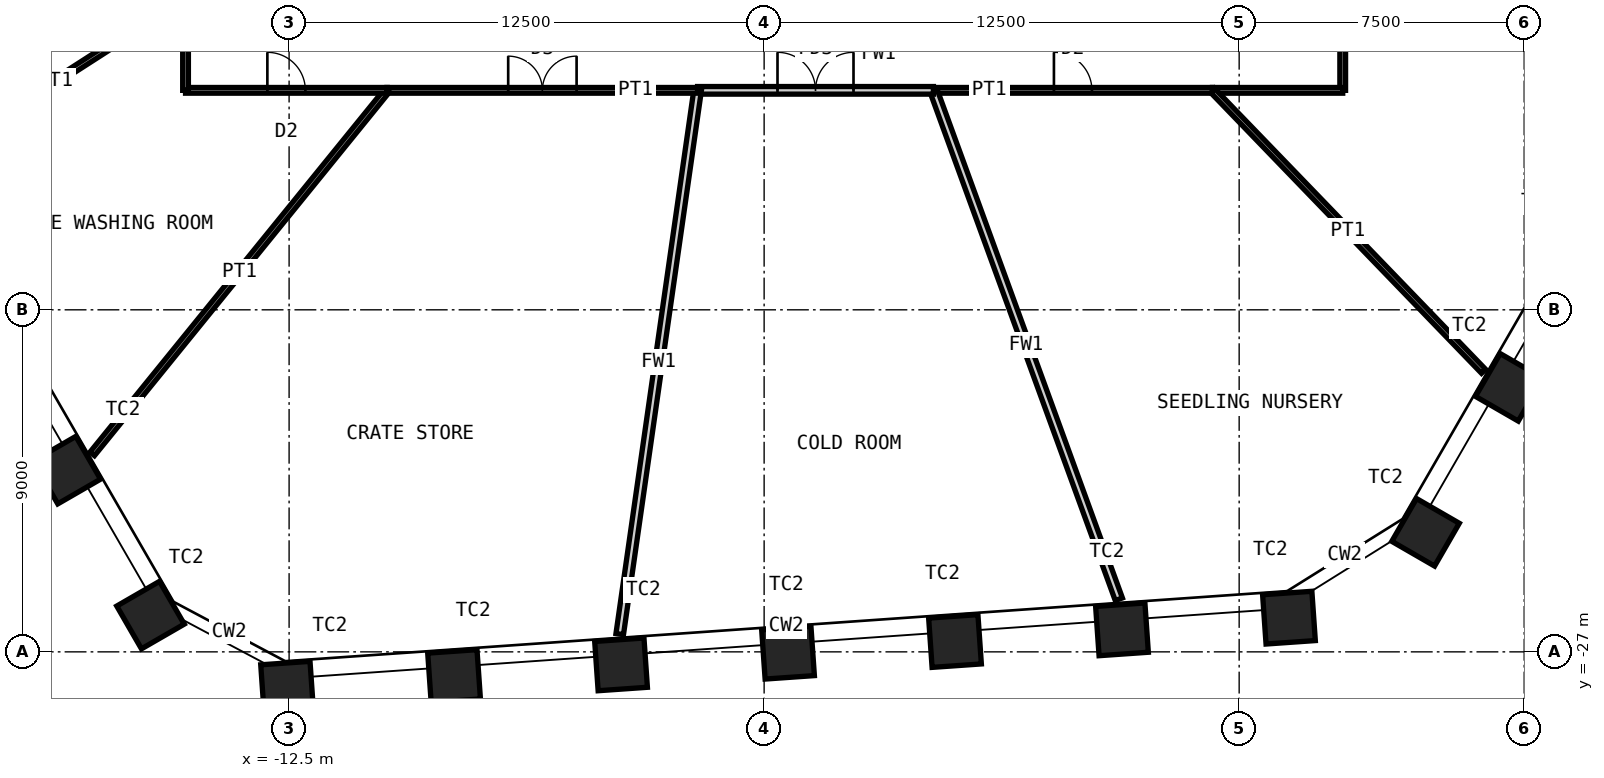
"""IFC4 building model, lengths in metres.
Left out: names, types, materials, properties, quantities, classifications, styles, units other than length and angle.
Written with IfcOpenShell. Run it as: python <this file> out.ifc"""

import sys

from ifc_helpers import new_model, si_unit, direction, frame, frame_2d, origin, origin_2d, place, context, subcontext, project, spatial, rectangle, hollow_rectangle, extrude, element, fill, save


model = new_model("IFC4")
c1 = context("Model", 3, precision=1e-05, world=origin(), true_north=direction((0.0, 1.0)))
c2 = subcontext(c1, "Body", "Model", "MODEL_VIEW")
j1 = project(units=[si_unit("LENGTHUNIT", "METRE"), si_unit("PLANEANGLEUNIT", "RADIAN")], contexts=[c1])
p1 = place(None, origin())
s1 = spatial("IfcSite", under=j1, at=p1, CompositionType="ELEMENT")
p2 = place(p1, origin())
s2 = spatial("IfcBuilding", under=s1, at=p2, CompositionType="ELEMENT")
p3 = place(p2, frame((0.0, 0.0, 87.0)))
s3 = spatial("IfcBuildingStorey", under=s2, at=p3, CompositionType="ELEMENT", Elevation=87.0)
for number, where, z_axis, x_axis in (
    (1, (19.607, -20.04, 0.0), (0.0, 0.0, 1.0), (0.5, 0.866, 0.0)),
    (2, (17.405, -23.854, 0.0), (0.0, 0.0, 1.0), (0.5, 0.866, 0.0)),
    (3, (13.811, -26.1, 0.0), (0.0, 0.0, 1.0), (0.998, 0.07, 0.0)),
    (4, (9.417, -26.407, 0.0), (0.0, 0.0, 1.0), (0.998, 0.07, 0.0)),
    (5, (5.023, -26.715, 0.0), (0.0, 0.0, 1.0), (0.998, 0.07, 0.0)),
    (6, (0.629, -27.022, 0.0), (0.0, 0.0, 1.0), (0.998, 0.07, 0.0)),
    (7, (-3.765, -27.329, 0.0), (0.0, 0.0, 1.0), (0.998, 0.07, 0.0)),
    (8, (-8.159, -27.636, 0.0), (0.0, 0.0, 1.0), (0.998, 0.07, 0.0)),
    (9, (-12.553, -27.944, 0.0), (0.0, 0.0, 1.0), (0.998, 0.07, 0.0)),
    (10, (-16.147, -26.033, 0.0), (0.0, 0.0, 1.0), (0.5, -0.866, 0.0)),
    (11, (-18.349, -22.218, 0.0), (0.0, 0.0, 1.0), (0.5, -0.866, 0.0)),
):
    element("IfcColumn", number, at=place(p3, frame(where, z_axis=z_axis, x_axis=x_axis)), inside=s3, PredefinedType="COLUMN", context=c2, shape_type="SweptSolid", body=[
        extrude(hollow_rectangle(XDim=1.3, YDim=1.3, WallThickness=0.1, at=origin_2d()), origin(), (0.0, 0.0, 1.0), 5.0),
    ])
p4 = place(p3, frame((15.225, -2.426, 0.0), z_axis=(0.0, 0.0, 1.0), x_axis=(0.0, -1.0, 0.0)))
e12 = element("IfcWall", 12, at=p4, inside=s3, PredefinedType="PARTITIONING", context=c2, shape_type="SweptSolid", body=[
    extrude(rectangle(XDim=9.799, YDim=0.15, at=frame_2d((4.899, 0.0))), origin(), (0.0, 0.0, 1.0), 4.8),
])
p5 = place(p4, frame((3.999, 0.0, 0.0)))
e13 = element("IfcOpeningElement", 13, at=p5, cuts=e12, PredefinedType="OPENING", context=c2, shape_type="SweptSolid", body=[
    extrude(rectangle(XDim=1.8, YDim=2.4, at=frame_2d((0.9, 1.2))), frame((0.0, 0.085, 0.0), z_axis=(0.0, -1.0, 0.0), x_axis=(1.0, 0.0, 0.0)), (0.0, 0.0, 1.0), 0.17),
])
p6 = place(p3, frame((15.225, -12.225, 0.0), z_axis=(0.0, 0.0, 1.0), x_axis=(-1.0, 0.0, 0.0)))
e14 = element("IfcWall", 14, at=p6, inside=s3, PredefinedType="PARTITIONING", context=c2, shape_type="SweptSolid", body=[
    extrude(rectangle(XDim=3.428, YDim=0.15, at=frame_2d((1.714, 0.0))), origin(), (0.0, 0.0, 1.0), 4.8),
])
p7 = place(p3, frame((18.931, -19.618, 0.0), z_axis=(0.0, 0.0, 1.0), x_axis=(-0.694399830455, 0.719589379761, 0.0)))
e15 = element("IfcWall", 15, at=p7, inside=s3, PredefinedType="PARTITIONING", context=c2, shape_type="SweptSolid", body=[
    extrude(rectangle(XDim=10.274, YDim=0.15, at=frame_2d((5.137, 0.0))), origin(), (0.0, 0.0, 1.0), 3.7),
])
p8 = place(p3, frame((11.797, -12.225, 0.0), z_axis=(0.0, 0.0, 1.0), x_axis=(-1.0, 0.0, 0.0)))
e16 = element("IfcWall", 16, at=p8, inside=s3, PredefinedType="PARTITIONING", context=c2, shape_type="SweptSolid", body=[
    extrude(rectangle(XDim=7.343, YDim=0.15, at=frame_2d((3.671, 0.0))), origin(), (0.0, 0.0, 1.0), 4.8),
])
p9 = place(p8, frame((3.171, 0.0, 0.0)))
e17 = element("IfcOpeningElement", 17, at=p9, cuts=e16, PredefinedType="OPENING", context=c2, shape_type="SweptSolid", body=[
    extrude(rectangle(XDim=1.0, YDim=2.4, at=frame_2d((0.5, 1.2))), frame((0.0, 0.085, 0.0), z_axis=(0.0, -1.0, 0.0), x_axis=(1.0, 0.0, 0.0)), (0.0, 0.0, 1.0), 0.17),
])
p10 = place(p3, frame((9.333, -25.615, 0.0), z_axis=(0.0, 0.0, 1.0), x_axis=(-0.342348208267, 0.939573150051, 0.0)))
e18 = element("IfcWall", 18, at=p10, inside=s3, PredefinedType="PARTITIONING", context=c2, shape_type="SweptSolid", body=[
    extrude(rectangle(XDim=14.251, YDim=0.2, at=frame_2d((7.125, 0.0))), origin(), (0.0, 0.0, 1.0), 3.7),
])
p11 = place(p3, frame((4.455, -12.225, 0.0), z_axis=(0.0, 0.0, 1.0), x_axis=(-1.0, 0.0, 0.0)))
e19 = element("IfcWall", 19, at=p11, inside=s3, PredefinedType="PARTITIONING", context=c2, shape_type="SweptSolid", body=[
    extrude(rectangle(XDim=6.205, YDim=0.2, at=frame_2d((3.103, 0.0))), origin(), (0.0, 0.0, 1.0), 4.8),
])
p12 = place(p11, frame((2.103, 0.0, 0.0)))
e20 = element("IfcOpeningElement", 20, at=p12, cuts=e19, PredefinedType="OPENING", context=c2, shape_type="SweptSolid", body=[
    extrude(rectangle(XDim=2.0, YDim=2.4, at=frame_2d((1.0, 1.2))), frame((0.0, 0.11, 0.0), z_axis=(0.0, -1.0, 0.0), x_axis=(1.0, 0.0, 0.0)), (0.0, 0.0, 1.0), 0.22),
])
p13 = place(p3, frame((-3.8, -26.532, 0.0), z_axis=(0.0, 0.0, 1.0), x_axis=(0.141776082978, 0.989898753558, 0.0)))
e21 = element("IfcWall", 21, at=p13, inside=s3, PredefinedType="PARTITIONING", context=c2, shape_type="SweptSolid", body=[
    extrude(rectangle(XDim=14.453, YDim=0.2, at=frame_2d((7.227, 0.0))), origin(), (0.0, 0.0, 1.0), 3.7),
])
p14 = place(p3, frame((-1.751, -12.225, 0.0), z_axis=(0.0, 0.0, 1.0), x_axis=(-1.0, 0.0, 0.0)))
e22 = element("IfcWall", 22, at=p14, inside=s3, PredefinedType="PARTITIONING", context=c2, shape_type="SweptSolid", body=[
    extrude(rectangle(XDim=8.168, YDim=0.15, at=frame_2d((4.084, 0.0))), origin(), (0.0, 0.0, 1.0), 4.8),
])
p15 = place(p14, frame((3.184, 0.0, 0.0)))
e23 = element("IfcOpeningElement", 23, at=p15, cuts=e22, PredefinedType="OPENING", context=c2, shape_type="SweptSolid", body=[
    extrude(rectangle(XDim=1.8, YDim=2.4, at=frame_2d((0.9, 1.2))), frame((0.0, 0.085, 0.0), z_axis=(0.0, -1.0, 0.0), x_axis=(1.0, 0.0, 0.0)), (0.0, 0.0, 1.0), 0.17),
])
p16 = place(p3, frame((-17.68, -21.791, 0.0), z_axis=(0.0, 0.0, 1.0), x_axis=(0.630058221556, 0.776547897718, 0.0)))
e24 = element("IfcWall", 24, at=p16, inside=s3, PredefinedType="PARTITIONING", context=c2, shape_type="SweptSolid", body=[
    extrude(rectangle(XDim=12.318, YDim=0.15, at=frame_2d((6.159, 0.0))), origin(), (0.0, 0.0, 1.0), 3.7),
])
p17 = place(p3, frame((-9.919, -12.225, 0.0), z_axis=(0.0, 0.0, 1.0), x_axis=(-1.0, 0.0, 0.0)))
e25 = element("IfcWall", 25, at=p17, inside=s3, PredefinedType="PARTITIONING", context=c2, shape_type="SweptSolid", body=[
    extrude(rectangle(XDim=5.306, YDim=0.15, at=frame_2d((2.653, 0.0))), origin(), (0.0, 0.0, 1.0), 4.8),
])
p18 = place(p17, frame((2.153, 0.0, 0.0)))
e26 = element("IfcOpeningElement", 26, at=p18, cuts=e25, PredefinedType="OPENING", context=c2, shape_type="SweptSolid", body=[
    extrude(rectangle(XDim=1.0, YDim=2.4, at=frame_2d((0.5, 1.2))), frame((0.0, 0.085, 0.0), z_axis=(0.0, -1.0, 0.0), x_axis=(1.0, 0.0, 0.0)), (0.0, 0.0, 1.0), 0.17),
])
p19 = place(p3, frame((-15.225, -12.225, 0.0), z_axis=(0.0, 0.0, 1.0), x_axis=(0.0, 1.0, 0.0)))
e27 = element("IfcWall", 27, at=p19, inside=s3, PredefinedType="PARTITIONING", context=c2, shape_type="SweptSolid", body=[
    extrude(rectangle(XDim=2.437, YDim=0.15, at=frame_2d((1.218, 0.0))), origin(), (0.0, 0.0, 1.0), 4.8),
])
p20 = place(p3, frame((-22.063, -14.185, 0.0), z_axis=(0.0, 0.0, 1.0), x_axis=(0.8411570088, 0.540790982309, 0.0)))
e28 = element("IfcWall", 28, at=p20, inside=s3, PredefinedType="PARTITIONING", context=c2, shape_type="SweptSolid", body=[
    extrude(rectangle(XDim=8.13, YDim=0.15, at=frame_2d((4.065, 0.0))), origin(), (0.0, 0.0, 1.0), 3.7),
])
p21 = place(p9, origin())
e29 = element("IfcDoor", 29, at=p21, inside=s3, OperationType="SINGLE_SWING_RIGHT", PredefinedType="DOOR", context=c2, shape_type="SweptSolid", body=[
    extrude(rectangle(XDim=1.0, YDim=2.4, at=frame_2d((0.5, 1.2))), frame((0.0, 0.025, 0.0), z_axis=(0.0, -1.0, 0.0), x_axis=(1.0, 0.0, 0.0)), (0.0, 0.0, 1.0), 0.05),
])
fill(e17, e29)
p22 = place(p12, origin())
e30 = element("IfcDoor", 30, at=p22, inside=s3, OperationType="DOUBLE_DOOR_DOUBLE_SWING", PredefinedType="DOOR", context=c2, shape_type="SweptSolid", body=[
    extrude(rectangle(XDim=2.0, YDim=2.4, at=frame_2d((1.0, 1.2))), frame((0.0, 0.025, 0.0), z_axis=(0.0, -1.0, 0.0), x_axis=(1.0, 0.0, 0.0)), (0.0, 0.0, 1.0), 0.05),
])
fill(e20, e30)
p23 = place(p15, origin())
e31 = element("IfcDoor", 31, at=p23, inside=s3, OperationType="DOUBLE_DOOR_DOUBLE_SWING", PredefinedType="DOOR", context=c2, shape_type="SweptSolid", body=[
    extrude(rectangle(XDim=1.8, YDim=2.4, at=frame_2d((0.9, 1.2))), frame((0.0, 0.025, 0.0), z_axis=(0.0, -1.0, 0.0), x_axis=(1.0, 0.0, 0.0)), (0.0, 0.0, 1.0), 0.05),
])
fill(e23, e31)
p24 = place(p18, origin())
e32 = element("IfcDoor", 32, at=p24, inside=s3, OperationType="SINGLE_SWING_RIGHT", PredefinedType="DOOR", context=c2, shape_type="SweptSolid", body=[
    extrude(rectangle(XDim=1.0, YDim=2.4, at=frame_2d((0.5, 1.2))), frame((0.0, 0.025, 0.0), z_axis=(0.0, -1.0, 0.0), x_axis=(1.0, 0.0, 0.0)), (0.0, 0.0, 1.0), 0.05),
])
fill(e26, e32)
save(model, sys.argv[1])
